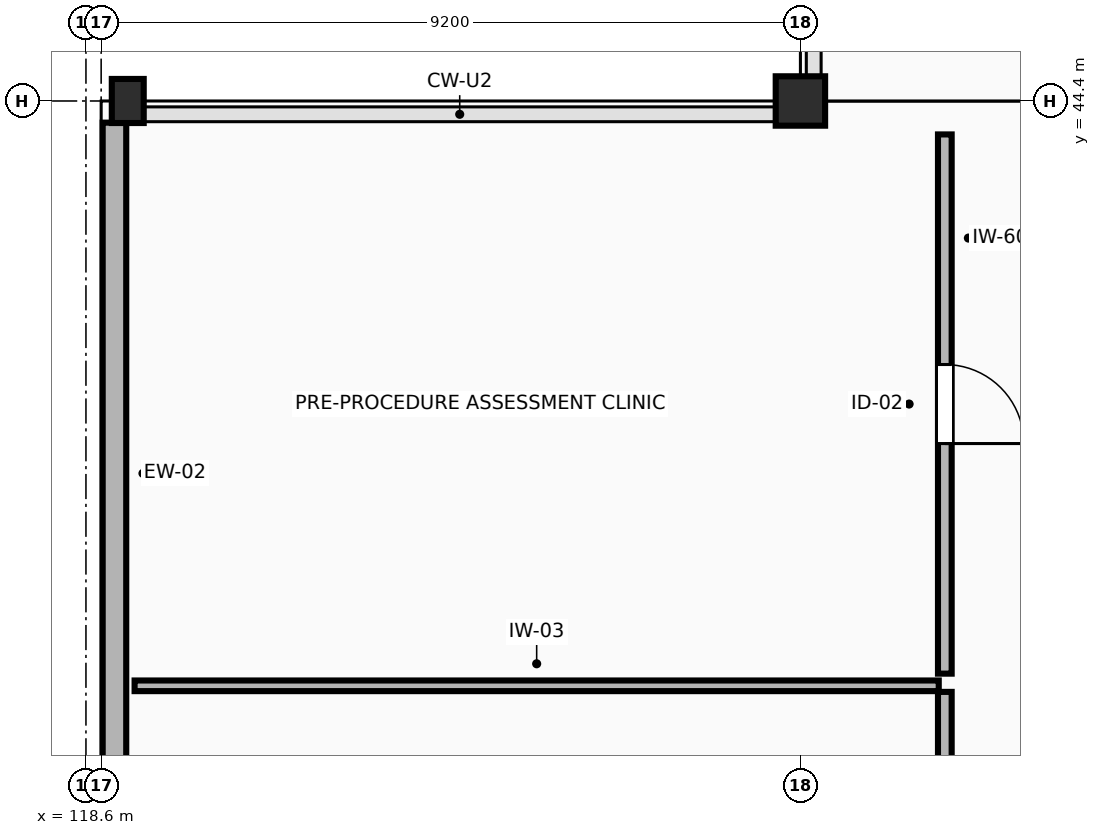
"""IFC4 building model, lengths in metres.
Left out: names, types, materials, properties, quantities, classifications, styles, units other than length and angle.
Written with IfcOpenShell. Run it as: python <this file> out.ifc"""

import sys

from ifc_helpers import new_model, si_unit, direction, frame, frame_2d, origin, origin_2d, place, context, subcontext, project, spatial, rectangle, extrude, element, fill, save


model = new_model("IFC4")
c1 = context("Model", 3, precision=1e-05, world=origin(), true_north=direction((0.0, 1.0)))
c2 = subcontext(c1, "Body", "Model", "MODEL_VIEW")
j1 = project(units=[si_unit("LENGTHUNIT", "METRE"), si_unit("PLANEANGLEUNIT", "RADIAN")], contexts=[c1])
p1 = place(None, origin())
s1 = spatial("IfcSite", under=j1, at=p1, CompositionType="ELEMENT")
p2 = place(p1, origin())
s2 = spatial("IfcBuilding", under=s1, at=p2, CompositionType="ELEMENT")
p3 = place(p2, origin())
s3 = spatial("IfcBuildingStorey", under=s2, at=p3, CompositionType="ELEMENT", Elevation=0.0)
p4 = place(p3, frame((119.15, 44.4, 0.0), z_axis=(0.0, 0.0, 1.0), x_axis=(1.0, 0.0, 0.0)))
e1 = element("IfcColumn", 1, at=p4, inside=s3, PredefinedType="COLUMN", context=c2, shape_type="SweptSolid", body=[
    extrude(rectangle(XDim=0.42, YDim=0.58, at=origin_2d()), origin(), (0.0, 0.0, 1.0), 5.4),
])
p5 = place(p3, frame((128.0, 44.4, 0.0), z_axis=(0.0, 0.0, 1.0), x_axis=(1.0, 0.0, 0.0)))
e2 = element("IfcColumn", 2, at=p5, inside=s3, PredefinedType="COLUMN", context=c2, shape_type="SweptSolid", body=[
    extrude(rectangle(XDim=0.65, YDim=0.65, at=origin_2d()), origin(), (0.0, 0.0, 1.0), 5.4),
])
p6 = place(p3, frame((118.975, 44.115, 0.0), z_axis=(0.0, 0.0, 1.0), x_axis=(0.0, -1.0, 0.0)))
e3 = element("IfcWall", 3, at=p6, inside=s3, PredefinedType="STANDARD", context=c2, shape_type="SweptSolid", body=[
    extrude(rectangle(XDim=9.23, YDim=0.31, at=frame_2d((4.615, 0.0))), origin(), (0.0, 0.0, 1.0), 4.445),
])
p7 = place(p3, frame((119.24, 36.705, 0.0), z_axis=(0.0, 0.0, 1.0), x_axis=(1.0, 0.0, 0.0)))
e4 = element("IfcWall", 4, at=p7, inside=s3, PredefinedType="PARTITIONING", context=c2, shape_type="SweptSolid", body=[
    extrude(rectangle(XDim=10.58, YDim=0.14, at=frame_2d((5.29, 0.0))), origin(), (0.0, 0.0, 1.0), 5.1),
])
p8 = place(p3, frame((129.9, 36.625, 0.0), z_axis=(0.0, 0.0, 1.0), x_axis=(0.0, -1.0, 0.0)))
e5 = element("IfcWall", 5, at=p8, inside=s3, PredefinedType="PARTITIONING", context=c2, shape_type="SweptSolid", body=[
    extrude(rectangle(XDim=7.095, YDim=0.18, at=frame_2d((3.547, 0.0))), origin(), (0.0, 0.0, 1.0), 5.1),
])
p9 = place(p3, frame((129.9, 43.96, 0.0), z_axis=(0.0, 0.0, 1.0), x_axis=(0.0, -1.0, 0.0)))
e6 = element("IfcWall", 6, at=p9, inside=s3, PredefinedType="PARTITIONING", context=c2, shape_type="SweptSolid", body=[
    extrude(rectangle(XDim=7.095, YDim=0.18, at=frame_2d((3.547, 0.0))), origin(), (0.0, 0.0, 1.0), 5.1),
])
p10 = place(p9, frame((3.028, 0.0, 0.0)))
e7 = element("IfcOpeningElement", 7, at=p10, cuts=e6, PredefinedType="OPENING", context=c2, shape_type="SweptSolid", body=[
    extrude(rectangle(XDim=1.04, YDim=2.15, at=frame_2d((0.52, 1.075))), frame((0.0, 0.1, 0.0), z_axis=(0.0, -1.0, 0.0), x_axis=(1.0, 0.0, 0.0)), (0.0, 0.0, 1.0), 0.2),
])
p11 = place(p10, origin())
e8 = element("IfcDoor", 8, at=p11, inside=s3, OperationType="SINGLE_SWING_RIGHT", PredefinedType="DOOR", context=c2, shape_type="SweptSolid", body=[
    extrude(rectangle(XDim=1.04, YDim=2.15, at=frame_2d((0.52, 1.075))), frame((0.0, 0.025, 0.0), z_axis=(0.0, -1.0, 0.0), x_axis=(1.0, 0.0, 0.0)), (0.0, 0.0, 1.0), 0.05),
])
fill(e7, e8)
save(model, sys.argv[1])
